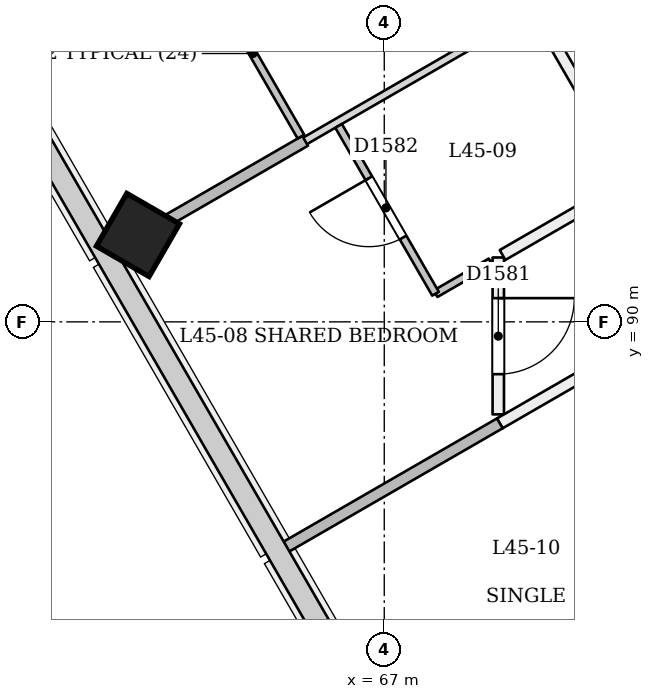
"""IFC4 building model, lengths in metres.
Left out: names, types, materials, properties, quantities, classifications, styles, units other than length and angle.
Written with IfcOpenShell. Run it as: python <this file> out.ifc"""

import sys

from ifc_helpers import new_model, si_unit, direction, frame, frame_2d, origin, origin_2d, place, context, subcontext, project, spatial, rectangle, extrude, element, fill, save


model = new_model("IFC4")
c1 = context("Model", 3, precision=1e-05, world=origin(), true_north=direction((0.0, 1.0)))
c2 = subcontext(c1, "Body", "Model", "MODEL_VIEW")
j1 = project(units=[si_unit("LENGTHUNIT", "METRE"), si_unit("PLANEANGLEUNIT", "RADIAN")], contexts=[c1])
p1 = place(None, origin())
s1 = spatial("IfcSite", under=j1, at=p1, CompositionType="ELEMENT")
p2 = place(p1, origin())
s2 = spatial("IfcBuilding", under=s1, at=p2, CompositionType="ELEMENT")
p3 = place(p2, frame((0.0, 0.0, 174.6)))
s3 = spatial("IfcBuildingStorey", under=s2, at=p3, CompositionType="ELEMENT", Elevation=174.6)
p4 = place(p3, frame((63.732, 91.096, -0.024), z_axis=(0.02222134892, 0.038480872521, 0.999012229206), x_axis=(-0.865643643917, -0.499179494629, 0.038482643982)))
e1 = element("IfcColumn", 1, at=p4, inside=s3, PredefinedType="COLUMN", context=c2, shape_type="SweptSolid", body=[
    extrude(rectangle(XDim=0.8, YDim=0.8, at=origin_2d()), origin(), (0.0, 0.0, 1.0), 3.604),
])
p5 = place(p3, frame((66.722, 98.019, 0.0), z_axis=(0.0, 0.0, 1.0), x_axis=(0.500008002287, -0.866020783612, 0.0)))
e2 = element("IfcWall", 2, at=p5, inside=s3, PredefinedType="PARTITIONING", context=c2, shape_type="SweptSolid", body=[
    extrude(rectangle(XDim=6.488, YDim=0.15, at=frame_2d((3.244, 0.0))), origin(), (0.0, 0.0, 1.0), 2.75),
])
p6 = place(p5, frame((0.571, 0.0, 0.0)))
e3 = element("IfcOpeningElement", 3, at=p6, cuts=e2, PredefinedType="OPENING", context=c2, shape_type="SweptSolid", body=[
    extrude(rectangle(XDim=1.1, YDim=2.1, at=frame_2d((0.55, 1.05))), frame((0.0, 0.085, 0.0), z_axis=(0.0, -1.0, 0.0), x_axis=(1.0, 0.0, 0.0)), (0.0, 0.0, 1.0), 0.171),
])
p7 = place(p3, frame((68.5, 90.847, 0.0), z_axis=(0.0, 0.0, 1.0), x_axis=(0.0, -1.0, 0.0)))
e4 = element("IfcWall", 4, at=p7, inside=s3, PredefinedType="PARTITIONING", context=c2, shape_type="SweptSolid", body=[
    extrude(rectangle(XDim=2.064, YDim=0.15, at=frame_2d((1.032, 0.0))), origin(), (0.0, 0.0, 1.0), 3.15),
])
p8 = place(p7, frame((0.535, 0.0, 0.0)))
e5 = element("IfcOpeningElement", 5, at=p8, cuts=e4, PredefinedType="OPENING", context=c2, shape_type="SweptSolid", body=[
    extrude(rectangle(XDim=1.0, YDim=2.1, at=frame_2d((0.5, 1.05))), frame((0.0, 0.085, 0.0), z_axis=(0.0, -1.0, 0.0), x_axis=(1.0, 0.0, 0.0)), (0.0, 0.0, 1.0), 0.171),
])
p9 = place(p3, frame((70.2, 91.828, 0.0), z_axis=(0.0, 0.0, 1.0), x_axis=(-0.866042076863, -0.499971120268, 0.0)))
e6 = element("IfcWall", 6, at=p9, inside=s3, PredefinedType="PARTITIONING", context=c2, shape_type="SweptSolid", body=[
    extrude(rectangle(XDim=1.898, YDim=0.15, at=frame_2d((0.949, 0.0))), origin(), (0.0, 0.0, 1.0), 3.15),
])
p10 = place(p3, frame((68.52, 88.665, 0.0), z_axis=(0.0, 0.0, 1.0), x_axis=(0.866044067064, 0.499967672858, 0.0)))
e7 = element("IfcWall", 7, at=p10, inside=s3, PredefinedType="PARTITIONING", context=c2, shape_type="SweptSolid", body=[
    extrude(rectangle(XDim=3.045, YDim=0.15, at=frame_2d((1.522, 0.0))), origin(), (0.0, 0.0, 1.0), 3.15),
])
p11 = place(p3, frame((65.904, 92.437, 0.0), z_axis=(0.0, 0.0, 1.0), x_axis=(-0.50001820224, 0.866014894461, 0.0)))
e8 = element("IfcWall", 8, at=p11, inside=s3, PredefinedType="PARTITIONING", context=c2, shape_type="SweptSolid", body=[
    extrude(rectangle(XDim=2.525, YDim=0.1, at=frame_2d((1.262, 0.0))), origin(), (0.0, 0.0, 1.0), 2.75),
])
p12 = place(p3, frame((63.43, 90.922, 0.0), z_axis=(0.0, 0.0, 1.0), x_axis=(0.865996226145, 0.500050533749, 0.0)))
e9 = element("IfcWall", 9, at=p12, inside=s3, PredefinedType="PARTITIONING", context=c2, shape_type="SweptSolid", body=[
    extrude(rectangle(XDim=2.92, YDim=0.15, at=frame_2d((1.46, 0.0))), origin(), (0.0, 0.0, 1.0), 2.65),
])
p13 = place(p3, frame((65.924, 92.362, 0.0), z_axis=(0.0, 0.0, 1.0), x_axis=(0.866032163869, 0.499988291006, 0.0)))
e10 = element("IfcWall", 10, at=p13, inside=s3, PredefinedType="PARTITIONING", context=c2, shape_type="SweptSolid", body=[
    extrude(rectangle(XDim=3.445, YDim=0.1, at=frame_2d((1.722, 0.0))), origin(), (0.0, 0.0, 1.0), 2.75),
])
p14 = place(p3, frame((68.4, 90.789, 0.0), z_axis=(0.0, 0.0, 1.0), x_axis=(-0.866083720475, -0.499898978922, 0.0)))
e11 = element("IfcWall", 11, at=p14, inside=s3, PredefinedType="PARTITIONING", context=c2, shape_type="SweptSolid", body=[
    extrude(rectangle(XDim=0.838, YDim=0.1, at=frame_2d((0.419, 0.0))), origin(), (0.0, 0.0, 1.0), 3.15),
])
p15 = place(p3, frame((67.674, 90.37, 0.0), z_axis=(0.0, 0.0, 1.0), x_axis=(-0.499990435942, 0.866030925526, 0.0)))
e12 = element("IfcWall", 12, at=p15, inside=s3, PredefinedType="PARTITIONING", context=c2, shape_type="SweptSolid", body=[
    extrude(rectangle(XDim=2.55, YDim=0.1, at=frame_2d((1.275, 0.0))), origin(), (0.0, 0.0, 1.0), 2.75),
])
p16 = place(p15, frame((0.854, 0.0, 0.0)))
e13 = element("IfcOpeningElement", 13, at=p16, cuts=e12, PredefinedType="OPENING", context=c2, shape_type="SweptSolid", body=[
    extrude(rectangle(XDim=0.9, YDim=2.1, at=frame_2d((0.45, 1.05))), frame((0.0, 0.061, 0.0), z_axis=(0.0, -1.0, 0.0), x_axis=(1.0, 0.0, 0.0)), (0.0, 0.0, 1.0), 0.121),
])
p17 = place(p3, frame((65.662, 87.014, 0.0), z_axis=(0.0, 0.0, 1.0), x_axis=(0.866008176907, 0.50002983664, 0.0)))
e14 = element("IfcWall", 14, at=p17, inside=s3, PredefinedType="PARTITIONING", context=c2, shape_type="SweptSolid", body=[
    extrude(rectangle(XDim=3.3, YDim=0.15, at=frame_2d((1.65, 0.0))), origin(), (0.0, 0.0, 1.0), 2.65),
])
p18 = place(p8, origin())
e15 = element("IfcDoor", 15, at=p18, inside=s3, OperationType="SINGLE_SWING_LEFT", PredefinedType="NOTDEFINED", context=c2, shape_type="SweptSolid", body=[
    extrude(rectangle(XDim=1.0, YDim=2.1, at=frame_2d((0.5, 1.05))), frame((0.0, 0.025, 0.0), z_axis=(0.0, -1.0, 0.0), x_axis=(1.0, 0.0, 0.0)), (0.0, 0.0, 1.0), 0.05),
])
fill(e5, e15)
p19 = place(p16, origin())
e16 = element("IfcDoor", 16, at=p19, inside=s3, OperationType="SINGLE_SWING_RIGHT", PredefinedType="NOTDEFINED", context=c2, shape_type="SweptSolid", body=[
    extrude(rectangle(XDim=0.9, YDim=2.1, at=frame_2d((0.45, 1.05))), frame((0.0, 0.025, 0.0), z_axis=(0.0, -1.0, 0.0), x_axis=(1.0, 0.0, 0.0)), (0.0, 0.0, 1.0), 0.05),
])
fill(e13, e16)
save(model, sys.argv[1])
